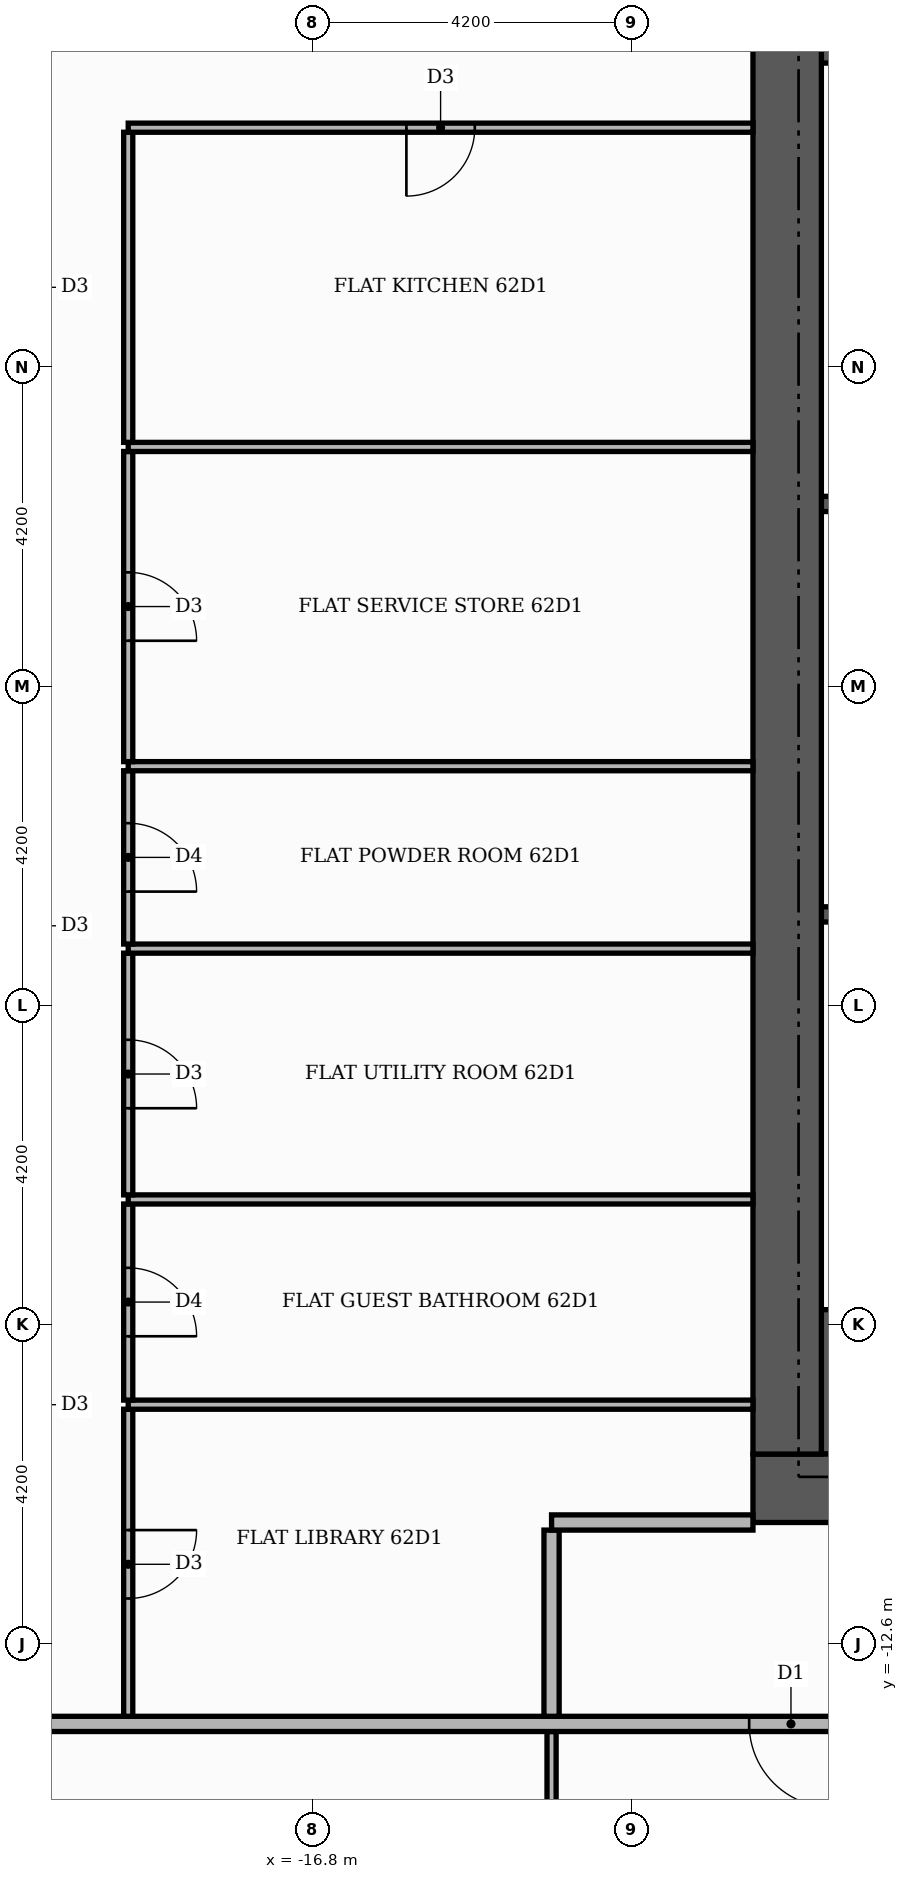
"""IFC4 building model, lengths in metres.
Left out: names, types, materials, properties, quantities, classifications, styles, units other than length and angle.
Written with IfcOpenShell. Run it as: python <this file> out.ifc"""

import sys

from ifc_helpers import new_model, si_unit, direction, frame, frame_2d, origin, place, context, subcontext, project, spatial, rectangle, extrude, element, fill, save


model = new_model("IFC4")
c1 = context("Model", 3, precision=1e-05, world=origin(), true_north=direction((0.0, 1.0)))
c2 = subcontext(c1, "Body", "Model", "MODEL_VIEW")
j1 = project(units=[si_unit("LENGTHUNIT", "METRE"), si_unit("PLANEANGLEUNIT", "RADIAN")], contexts=[c1])
p1 = place(None, origin())
s1 = spatial("IfcSite", under=j1, at=p1, CompositionType="ELEMENT")
p2 = place(p1, origin())
s2 = spatial("IfcBuilding", under=s1, at=p2, CompositionType="ELEMENT")
p3 = place(p2, frame((0.0, 0.0, 260.1)))
s3 = spatial("IfcBuildingStorey", under=s2, at=p3, CompositionType="ELEMENT", Elevation=260.1)
for number, where, z_axis, x_axis in (
    (1, (-10.1, -9.15, 0.0), (0.0, 0.0, 1.0), (1.0, 0.0, 0.0)),
    (2, (-10.1, 9.15, 0.0), (0.0, 0.0, 1.0), (1.0, 0.0, 0.0)),
):
    element("IfcWall", number, at=place(p3, frame(where, z_axis=z_axis, x_axis=x_axis)), inside=s3, PredefinedType="SHEAR", context=c2, shape_type="SweptSolid", body=[
        extrude(rectangle(XDim=4.6, YDim=1.9, at=frame_2d((2.3, 0.0))), origin(), (0.0, 0.0, 1.0), 3.48),
    ])
for number, where, z_axis, x_axis in (
    (3, (-10.1, -3.0, 0.0), (0.0, 0.0, 1.0), (1.0, 0.0, 0.0)),
    (4, (-10.1, 2.4, 0.0), (0.0, 0.0, 1.0), (1.0, 0.0, 0.0)),
):
    element("IfcWall", number, at=place(p3, frame(where, z_axis=z_axis, x_axis=x_axis)), inside=s3, PredefinedType="SHEAR", context=c2, shape_type="SweptSolid", body=[
        extrude(rectangle(XDim=0.9, YDim=0.2, at=frame_2d((0.45, 0.0))), origin(), (0.0, 0.0, 1.0), 3.48),
    ])
p4 = place(p3, frame((-11.0, -10.55, 0.0), z_axis=(0.0, 0.0, 1.0), x_axis=(1.0, 0.0, 0.0)))
e5 = element("IfcWall", 5, at=p4, inside=s3, PredefinedType="SHEAR", context=c2, shape_type="SweptSolid", body=[
    extrude(rectangle(XDim=22.0, YDim=0.9, at=frame_2d((11.0, 0.0))), origin(), (0.0, 0.0, 1.0), 3.48),
])
p5 = place(p4, frame((7.4, 0.0, 0.0)))
e6 = element("IfcOpeningElement", 6, at=p5, cuts=e5, PredefinedType="OPENING", context=c2, shape_type="SweptSolid", body=[
    extrude(rectangle(XDim=1.8, YDim=2.2, at=frame_2d((0.9, 1.1))), frame((0.0, 0.46, 0.0), z_axis=(0.0, -1.0, 0.0), x_axis=(1.0, 0.0, 0.0)), (0.0, 0.0, 1.0), 0.92),
])
p6 = place(p3, frame((-10.55, -10.1, 0.0), z_axis=(0.0, 0.0, 1.0), x_axis=(0.0, 1.0, 0.0)))
e7 = element("IfcWall", 7, at=p6, inside=s3, PredefinedType="SHEAR", context=c2, shape_type="SweptSolid", body=[
    extrude(rectangle(XDim=20.2, YDim=0.9, at=frame_2d((10.1, 0.0))), origin(), (0.0, 0.0, 1.0), 3.48),
])
p7 = place(p3, frame((-13.65, -20.66, 0.0), z_axis=(0.0, 0.0, 1.0), x_axis=(0.0, 1.0, 0.0)))
e8 = element("IfcWall", 8, at=p7, inside=s3, PredefinedType="PARTITIONING", context=c2, shape_type="SweptSolid", body=[
    extrude(rectangle(XDim=6.91, YDim=0.12, at=frame_2d((3.455, 0.0))), origin(), (0.0, 0.0, 1.0), 3.48),
])
p8 = place(p7, frame((3.025, 0.0, 0.0)))
e9 = element("IfcOpeningElement", 9, at=p8, cuts=e8, PredefinedType="OPENING", context=c2, shape_type="SweptSolid", body=[
    extrude(rectangle(XDim=0.9, YDim=2.1, at=frame_2d((0.45, 1.05))), frame((0.0, 0.07, 0.0), z_axis=(0.0, -1.0, 0.0), x_axis=(1.0, 0.0, 0.0)), (0.0, 0.0, 1.0), 0.14),
])
p9 = place(p3, frame((-25.42, -13.65, 0.0), z_axis=(0.0, 0.0, 1.0), x_axis=(1.0, 0.0, 0.0)))
e10 = element("IfcWall", 10, at=p9, inside=s3, PredefinedType="PARTITIONING", context=c2, shape_type="SweptSolid", body=[
    extrude(rectangle(XDim=39.07, YDim=0.2, at=frame_2d((19.535, 0.0))), origin(), (0.0, 0.0, 1.0), 3.48),
])
p10 = place(p9, frame((14.37, 0.0, 0.0)))
e11 = element("IfcOpeningElement", 11, at=p10, cuts=e10, PredefinedType="OPENING", context=c2, shape_type="SweptSolid", body=[
    extrude(rectangle(XDim=1.1, YDim=2.4, at=frame_2d((0.55, 1.2))), frame((0.0, 0.11, 0.0), z_axis=(0.0, -1.0, 0.0), x_axis=(1.0, 0.0, 0.0)), (0.0, 0.0, 1.0), 0.22),
])
p11 = place(p3, frame((-19.22, -13.55, 0.0), z_axis=(0.0, 0.0, 1.0), x_axis=(0.0, 1.0, 0.0)))
e12 = element("IfcWall", 12, at=p11, inside=s3, PredefinedType="PARTITIONING", context=c2, shape_type="SweptSolid", body=[
    extrude(rectangle(XDim=4.04, YDim=0.12, at=frame_2d((2.02, 0.0))), origin(), (0.0, 0.0, 1.0), 3.48),
])
p12 = place(p11, frame((1.55, 0.0, 0.0)))
e13 = element("IfcOpeningElement", 13, at=p12, cuts=e12, PredefinedType="OPENING", context=c2, shape_type="SweptSolid", body=[
    extrude(rectangle(XDim=0.9, YDim=2.1, at=frame_2d((0.45, 1.05))), frame((0.0, 0.07, 0.0), z_axis=(0.0, -1.0, 0.0), x_axis=(1.0, 0.0, 0.0)), (0.0, 0.0, 1.0), 0.14),
])
p13 = place(p3, frame((-13.65, -13.55, 0.0), z_axis=(0.0, 0.0, 1.0), x_axis=(0.0, 1.0, 0.0)))
e14 = element("IfcWall", 14, at=p13, inside=s3, PredefinedType="PARTITIONING", context=c2, shape_type="SweptSolid", body=[
    extrude(rectangle(XDim=2.45, YDim=0.2, at=frame_2d((1.225, 0.0))), origin(), (0.0, 0.0, 1.0), 3.48),
])
p14 = place(p3, frame((-13.65, -11.0, 0.0), z_axis=(0.0, 0.0, 1.0), x_axis=(1.0, 0.0, 0.0)))
e15 = element("IfcWall", 15, at=p14, inside=s3, PredefinedType="PARTITIONING", context=c2, shape_type="SweptSolid", body=[
    extrude(rectangle(XDim=2.65, YDim=0.2, at=frame_2d((1.325, 0.0))), origin(), (0.0, 0.0, 1.0), 3.48),
])
p15 = place(p3, frame((-19.22, -9.45, 0.0), z_axis=(0.0, 0.0, 1.0), x_axis=(1.0, 0.0, 0.0)))
e16 = element("IfcWall", 16, at=p15, inside=s3, PredefinedType="PARTITIONING", context=c2, shape_type="SweptSolid", body=[
    extrude(rectangle(XDim=8.22, YDim=0.12, at=frame_2d((4.11, 0.0))), origin(), (0.0, 0.0, 1.0), 3.48),
])
p16 = place(p3, frame((-19.22, -9.39, 0.0), z_axis=(0.0, 0.0, 1.0), x_axis=(0.0, 1.0, 0.0)))
e17 = element("IfcWall", 17, at=p16, inside=s3, PredefinedType="PARTITIONING", context=c2, shape_type="SweptSolid", body=[
    extrude(rectangle(XDim=2.58, YDim=0.12, at=frame_2d((1.29, 0.0))), origin(), (0.0, 0.0, 1.0), 3.48),
])
p17 = place(p16, frame((0.84, 0.0, 0.0)))
e18 = element("IfcOpeningElement", 18, at=p17, cuts=e17, PredefinedType="OPENING", context=c2, shape_type="SweptSolid", body=[
    extrude(rectangle(XDim=0.9, YDim=2.1, at=frame_2d((0.45, 1.05))), frame((0.0, 0.07, 0.0), z_axis=(0.0, -1.0, 0.0), x_axis=(1.0, 0.0, 0.0)), (0.0, 0.0, 1.0), 0.14),
])
p18 = place(p3, frame((-19.22, -6.75, 0.0), z_axis=(0.0, 0.0, 1.0), x_axis=(1.0, 0.0, 0.0)))
e19 = element("IfcWall", 19, at=p18, inside=s3, PredefinedType="PARTITIONING", context=c2, shape_type="SweptSolid", body=[
    extrude(rectangle(XDim=8.22, YDim=0.12, at=frame_2d((4.11, 0.0))), origin(), (0.0, 0.0, 1.0), 3.48),
])
p19 = place(p3, frame((-19.22, -6.69, 0.0), z_axis=(0.0, 0.0, 1.0), x_axis=(0.0, 1.0, 0.0)))
e20 = element("IfcWall", 20, at=p19, inside=s3, PredefinedType="PARTITIONING", context=c2, shape_type="SweptSolid", body=[
    extrude(rectangle(XDim=3.18, YDim=0.12, at=frame_2d((1.59, 0.0))), origin(), (0.0, 0.0, 1.0), 3.48),
])
p20 = place(p19, frame((1.14, 0.0, 0.0)))
e21 = element("IfcOpeningElement", 21, at=p20, cuts=e20, PredefinedType="OPENING", context=c2, shape_type="SweptSolid", body=[
    extrude(rectangle(XDim=0.9, YDim=2.1, at=frame_2d((0.45, 1.05))), frame((0.0, 0.07, 0.0), z_axis=(0.0, -1.0, 0.0), x_axis=(1.0, 0.0, 0.0)), (0.0, 0.0, 1.0), 0.14),
])
p21 = place(p3, frame((-19.22, -3.45, 0.0), z_axis=(0.0, 0.0, 1.0), x_axis=(1.0, 0.0, 0.0)))
e22 = element("IfcWall", 22, at=p21, inside=s3, PredefinedType="PARTITIONING", context=c2, shape_type="SweptSolid", body=[
    extrude(rectangle(XDim=8.22, YDim=0.12, at=frame_2d((4.11, 0.0))), origin(), (0.0, 0.0, 1.0), 3.48),
])
p22 = place(p3, frame((-19.22, -3.39, 0.0), z_axis=(0.0, 0.0, 1.0), x_axis=(0.0, 1.0, 0.0)))
e23 = element("IfcWall", 23, at=p22, inside=s3, PredefinedType="PARTITIONING", context=c2, shape_type="SweptSolid", body=[
    extrude(rectangle(XDim=2.28, YDim=0.12, at=frame_2d((1.14, 0.0))), origin(), (0.0, 0.0, 1.0), 3.48),
])
p23 = place(p22, frame((0.69, 0.0, 0.0)))
e24 = element("IfcOpeningElement", 24, at=p23, cuts=e23, PredefinedType="OPENING", context=c2, shape_type="SweptSolid", body=[
    extrude(rectangle(XDim=0.9, YDim=2.1, at=frame_2d((0.45, 1.05))), frame((0.0, 0.07, 0.0), z_axis=(0.0, -1.0, 0.0), x_axis=(1.0, 0.0, 0.0)), (0.0, 0.0, 1.0), 0.14),
])
p24 = place(p3, frame((-19.22, -1.05, 0.0), z_axis=(0.0, 0.0, 1.0), x_axis=(1.0, 0.0, 0.0)))
e25 = element("IfcWall", 25, at=p24, inside=s3, PredefinedType="PARTITIONING", context=c2, shape_type="SweptSolid", body=[
    extrude(rectangle(XDim=8.22, YDim=0.12, at=frame_2d((4.11, 0.0))), origin(), (0.0, 0.0, 1.0), 3.48),
])
p25 = place(p3, frame((-19.22, -0.99, 0.0), z_axis=(0.0, 0.0, 1.0), x_axis=(0.0, 1.0, 0.0)))
e26 = element("IfcWall", 26, at=p25, inside=s3, PredefinedType="PARTITIONING", context=c2, shape_type="SweptSolid", body=[
    extrude(rectangle(XDim=4.08, YDim=0.12, at=frame_2d((2.04, 0.0))), origin(), (0.0, 0.0, 1.0), 3.48),
])
p26 = place(p25, frame((1.59, 0.0, 0.0)))
e27 = element("IfcOpeningElement", 27, at=p26, cuts=e26, PredefinedType="OPENING", context=c2, shape_type="SweptSolid", body=[
    extrude(rectangle(XDim=0.9, YDim=2.1, at=frame_2d((0.45, 1.05))), frame((0.0, 0.07, 0.0), z_axis=(0.0, -1.0, 0.0), x_axis=(1.0, 0.0, 0.0)), (0.0, 0.0, 1.0), 0.14),
])
p27 = place(p3, frame((-19.22, 3.15, 0.0), z_axis=(0.0, 0.0, 1.0), x_axis=(1.0, 0.0, 0.0)))
e28 = element("IfcWall", 28, at=p27, inside=s3, PredefinedType="PARTITIONING", context=c2, shape_type="SweptSolid", body=[
    extrude(rectangle(XDim=8.22, YDim=0.12, at=frame_2d((4.11, 0.0))), origin(), (0.0, 0.0, 1.0), 3.48),
])
p28 = place(p3, frame((-19.22, 3.21, 0.0), z_axis=(0.0, 0.0, 1.0), x_axis=(0.0, 1.0, 0.0)))
e29 = element("IfcWall", 29, at=p28, inside=s3, PredefinedType="PARTITIONING", context=c2, shape_type="SweptSolid", body=[
    extrude(rectangle(XDim=4.08, YDim=0.12, at=frame_2d((2.04, 0.0))), origin(), (0.0, 0.0, 1.0), 3.48),
])
p29 = place(p3, frame((-19.22, 7.35, 0.0), z_axis=(0.0, 0.0, 1.0), x_axis=(1.0, 0.0, 0.0)))
e30 = element("IfcWall", 30, at=p29, inside=s3, PredefinedType="PARTITIONING", context=c2, shape_type="SweptSolid", body=[
    extrude(rectangle(XDim=8.22, YDim=0.12, at=frame_2d((4.11, 0.0))), origin(), (0.0, 0.0, 1.0), 3.48),
])
p30 = place(p29, frame((3.66, 0.0, 0.0)))
e31 = element("IfcOpeningElement", 31, at=p30, cuts=e30, PredefinedType="OPENING", context=c2, shape_type="SweptSolid", body=[
    extrude(rectangle(XDim=0.9, YDim=2.1, at=frame_2d((0.45, 1.05))), frame((0.0, 0.07, 0.0), z_axis=(0.0, -1.0, 0.0), x_axis=(1.0, 0.0, 0.0)), (0.0, 0.0, 1.0), 0.14),
])
p31 = place(p10, frame((1.1, 0.0, 0.0), z_axis=(0.0, 0.0, 1.0), x_axis=(-1.0, 0.0, 0.0)))
e32 = element("IfcDoor", 32, at=p31, inside=s3, OperationType="SINGLE_SWING_RIGHT", PredefinedType="DOOR", context=c2, shape_type="SweptSolid", body=[
    extrude(rectangle(XDim=1.1, YDim=2.4, at=frame_2d((0.55, 1.2))), frame((0.0, 0.025, 0.0), z_axis=(0.0, -1.0, 0.0), x_axis=(1.0, 0.0, 0.0)), (0.0, 0.0, 1.0), 0.05),
])
fill(e11, e32)
p32 = place(p30, frame((0.9, 0.0, 0.0), z_axis=(0.0, 0.0, 1.0), x_axis=(-1.0, 0.0, 0.0)))
e33 = element("IfcDoor", 33, at=p32, inside=s3, OperationType="SINGLE_SWING_LEFT", PredefinedType="DOOR", context=c2, shape_type="SweptSolid", body=[
    extrude(rectangle(XDim=0.9, YDim=2.1, at=frame_2d((0.45, 1.05))), frame((0.0, 0.025, 0.0), z_axis=(0.0, -1.0, 0.0), x_axis=(1.0, 0.0, 0.0)), (0.0, 0.0, 1.0), 0.05),
])
fill(e31, e33)
p33 = place(p26, frame((0.9, 0.0, 0.0), z_axis=(0.0, 0.0, 1.0), x_axis=(-1.0, 0.0, 0.0)))
e34 = element("IfcDoor", 34, at=p33, inside=s3, OperationType="SINGLE_SWING_LEFT", PredefinedType="DOOR", context=c2, shape_type="SweptSolid", body=[
    extrude(rectangle(XDim=0.9, YDim=2.1, at=frame_2d((0.45, 1.05))), frame((0.0, 0.025, 0.0), z_axis=(0.0, -1.0, 0.0), x_axis=(1.0, 0.0, 0.0)), (0.0, 0.0, 1.0), 0.05),
])
fill(e27, e34)
p34 = place(p23, frame((0.9, 0.0, 0.0), z_axis=(0.0, 0.0, 1.0), x_axis=(-1.0, 0.0, 0.0)))
e35 = element("IfcDoor", 35, at=p34, inside=s3, OperationType="SINGLE_SWING_LEFT", PredefinedType="DOOR", context=c2, shape_type="SweptSolid", body=[
    extrude(rectangle(XDim=0.9, YDim=2.1, at=frame_2d((0.45, 1.05))), frame((0.0, 0.025, 0.0), z_axis=(0.0, -1.0, 0.0), x_axis=(1.0, 0.0, 0.0)), (0.0, 0.0, 1.0), 0.05),
])
fill(e24, e35)
p35 = place(p20, frame((0.9, 0.0, 0.0), z_axis=(0.0, 0.0, 1.0), x_axis=(-1.0, 0.0, 0.0)))
e36 = element("IfcDoor", 36, at=p35, inside=s3, OperationType="SINGLE_SWING_LEFT", PredefinedType="DOOR", context=c2, shape_type="SweptSolid", body=[
    extrude(rectangle(XDim=0.9, YDim=2.1, at=frame_2d((0.45, 1.05))), frame((0.0, 0.025, 0.0), z_axis=(0.0, -1.0, 0.0), x_axis=(1.0, 0.0, 0.0)), (0.0, 0.0, 1.0), 0.05),
])
fill(e21, e36)
p36 = place(p17, frame((0.9, 0.0, 0.0), z_axis=(0.0, 0.0, 1.0), x_axis=(-1.0, 0.0, 0.0)))
e37 = element("IfcDoor", 37, at=p36, inside=s3, OperationType="SINGLE_SWING_LEFT", PredefinedType="DOOR", context=c2, shape_type="SweptSolid", body=[
    extrude(rectangle(XDim=0.9, YDim=2.1, at=frame_2d((0.45, 1.05))), frame((0.0, 0.025, 0.0), z_axis=(0.0, -1.0, 0.0), x_axis=(1.0, 0.0, 0.0)), (0.0, 0.0, 1.0), 0.05),
])
fill(e18, e37)
p37 = place(p12, frame((0.9, 0.0, 0.0), z_axis=(0.0, 0.0, 1.0), x_axis=(-1.0, 0.0, 0.0)))
e38 = element("IfcDoor", 38, at=p37, inside=s3, OperationType="SINGLE_SWING_RIGHT", PredefinedType="DOOR", context=c2, shape_type="SweptSolid", body=[
    extrude(rectangle(XDim=0.9, YDim=2.1, at=frame_2d((0.45, 1.05))), frame((0.0, 0.025, 0.0), z_axis=(0.0, -1.0, 0.0), x_axis=(1.0, 0.0, 0.0)), (0.0, 0.0, 1.0), 0.05),
])
fill(e13, e38)
save(model, sys.argv[1])
